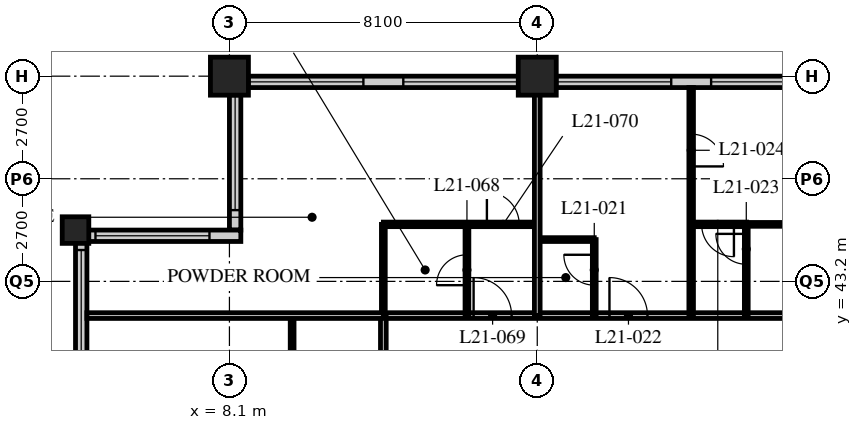
"""IFC4 building model, lengths in metres.
Left out: names, types, materials, properties, quantities, classifications, styles, units other than length and angle.
Written with IfcOpenShell. Run it as: python <this file> out.ifc"""

import sys

from ifc_helpers import new_model, si_unit, direction, frame, frame_2d, origin, origin_2d, place, context, subcontext, project, spatial, rectangle, hollow_rectangle, extrude, element, fill, save


model = new_model("IFC4")
c1 = context("Model", 3, precision=1e-05, world=origin(), true_north=direction((0.0, 1.0)))
c2 = subcontext(c1, "Body", "Model", "MODEL_VIEW")
j1 = project(units=[si_unit("LENGTHUNIT", "METRE"), si_unit("PLANEANGLEUNIT", "RADIAN")], contexts=[c1])
p1 = place(None, origin())
s1 = spatial("IfcSite", under=j1, at=p1, CompositionType="ELEMENT")
p2 = place(p1, origin())
s2 = spatial("IfcBuilding", under=s1, at=p2, CompositionType="ELEMENT")
p3 = place(p2, frame((0.0, 0.0, 84.0)))
s3 = spatial("IfcBuildingStorey", under=s2, at=p3, CompositionType="ELEMENT", Elevation=84.0)
p4 = place(p3, frame((4.05, 44.55, 0.0), z_axis=(0.0, 0.0, 1.0), x_axis=(1.0, 0.0, 0.0)))
e1 = element("IfcColumn", 1, at=p4, inside=s3, PredefinedType="COLUMN", context=c2, shape_type="SweptSolid", body=[
    extrude(hollow_rectangle(XDim=0.7, YDim=0.7, WallThickness=0.07, at=origin_2d()), origin(), (0.0, 0.0, 1.0), 3.4),
])
for number, where, z_axis, x_axis in (
    (2, (8.1, 48.6, 0.0), (0.0, 0.0, 1.0), (1.0, 0.0, 0.0)),
    (3, (16.2, 48.6, 0.0), (0.0, 0.0, 1.0), (1.0, 0.0, 0.0)),
):
    element("IfcColumn", number, at=place(p3, frame(where, z_axis=z_axis, x_axis=x_axis)), inside=s3, PredefinedType="COLUMN", context=c2, shape_type="SweptSolid", body=[
        extrude(hollow_rectangle(XDim=1.0, YDim=1.0, WallThickness=0.1, at=origin_2d()), origin(), (0.0, 0.0, 1.0), 3.4),
    ])
p5 = place(p3, frame((48.3, 48.45, 0.0), z_axis=(0.0, 0.0, 1.0), x_axis=(-1.0, 0.0, 0.0)))
e4 = element("IfcWall", 4, at=p5, inside=s3, PredefinedType="SOLIDWALL", context=c2, shape_type="SweptSolid", body=[
    extrude(rectangle(XDim=40.2, YDim=0.3, at=frame_2d((20.1, 0.0))), origin(), (0.0, 0.0, 1.0), 3.19),
])
p6 = place(p5, frame((0.225, 0.0, 0.9)))
e5 = element("IfcOpeningElement", 5, at=p6, cuts=e4, PredefinedType="OPENING", context=c2, shape_type="SweptSolid", body=[
    extrude(rectangle(XDim=3.0, YDim=1.5, at=frame_2d((1.5, 0.75))), frame((0.0, 0.16, 0.0), z_axis=(0.0, -1.0, 0.0), x_axis=(1.0, 0.0, 0.0)), (0.0, 0.0, 1.0), 0.32),
])
p7 = place(p5, frame((4.275, 0.0, 0.9)))
e6 = element("IfcOpeningElement", 6, at=p7, cuts=e4, PredefinedType="OPENING", context=c2, shape_type="SweptSolid", body=[
    extrude(rectangle(XDim=3.0, YDim=1.5, at=frame_2d((1.5, 0.75))), frame((0.0, 0.16, 0.0), z_axis=(0.0, -1.0, 0.0), x_axis=(1.0, 0.0, 0.0)), (0.0, 0.0, 1.0), 0.32),
])
p8 = place(p5, frame((8.325, 0.0, 0.9)))
e7 = element("IfcOpeningElement", 7, at=p8, cuts=e4, PredefinedType="OPENING", context=c2, shape_type="SweptSolid", body=[
    extrude(rectangle(XDim=3.0, YDim=1.5, at=frame_2d((1.5, 0.75))), frame((0.0, 0.16, 0.0), z_axis=(0.0, -1.0, 0.0), x_axis=(1.0, 0.0, 0.0)), (0.0, 0.0, 1.0), 0.32),
])
p9 = place(p5, frame((12.375, 0.0, 0.9)))
e8 = element("IfcOpeningElement", 8, at=p9, cuts=e4, PredefinedType="OPENING", context=c2, shape_type="SweptSolid", body=[
    extrude(rectangle(XDim=3.0, YDim=1.5, at=frame_2d((1.5, 0.75))), frame((0.0, 0.16, 0.0), z_axis=(0.0, -1.0, 0.0), x_axis=(1.0, 0.0, 0.0)), (0.0, 0.0, 1.0), 0.32),
])
p10 = place(p5, frame((16.425, 0.0, 0.9)))
e9 = element("IfcOpeningElement", 9, at=p10, cuts=e4, PredefinedType="OPENING", context=c2, shape_type="SweptSolid", body=[
    extrude(rectangle(XDim=3.0, YDim=1.5, at=frame_2d((1.5, 0.75))), frame((0.0, 0.16, 0.0), z_axis=(0.0, -1.0, 0.0), x_axis=(1.0, 0.0, 0.0)), (0.0, 0.0, 1.0), 0.32),
])
p11 = place(p5, frame((20.475, 0.0, 0.9)))
e10 = element("IfcOpeningElement", 10, at=p11, cuts=e4, PredefinedType="OPENING", context=c2, shape_type="SweptSolid", body=[
    extrude(rectangle(XDim=3.0, YDim=1.5, at=frame_2d((1.5, 0.75))), frame((0.0, 0.16, 0.0), z_axis=(0.0, -1.0, 0.0), x_axis=(1.0, 0.0, 0.0)), (0.0, 0.0, 1.0), 0.32),
])
p12 = place(p5, frame((24.525, 0.0, 0.9)))
e11 = element("IfcOpeningElement", 11, at=p12, cuts=e4, PredefinedType="OPENING", context=c2, shape_type="SweptSolid", body=[
    extrude(rectangle(XDim=3.0, YDim=1.5, at=frame_2d((1.5, 0.75))), frame((0.0, 0.16, 0.0), z_axis=(0.0, -1.0, 0.0), x_axis=(1.0, 0.0, 0.0)), (0.0, 0.0, 1.0), 0.32),
])
p13 = place(p5, frame((28.575, 0.0, 0.9)))
e12 = element("IfcOpeningElement", 12, at=p13, cuts=e4, PredefinedType="OPENING", context=c2, shape_type="SweptSolid", body=[
    extrude(rectangle(XDim=3.0, YDim=1.5, at=frame_2d((1.5, 0.75))), frame((0.0, 0.16, 0.0), z_axis=(0.0, -1.0, 0.0), x_axis=(1.0, 0.0, 0.0)), (0.0, 0.0, 1.0), 0.32),
])
p14 = place(p5, frame((32.625, 0.0, 0.9)))
e13 = element("IfcOpeningElement", 13, at=p14, cuts=e4, PredefinedType="OPENING", context=c2, shape_type="SweptSolid", body=[
    extrude(rectangle(XDim=3.0, YDim=1.5, at=frame_2d((1.5, 0.75))), frame((0.0, 0.16, 0.0), z_axis=(0.0, -1.0, 0.0), x_axis=(1.0, 0.0, 0.0)), (0.0, 0.0, 1.0), 0.32),
])
p15 = place(p5, frame((36.675, 0.0, 0.9)))
e14 = element("IfcOpeningElement", 14, at=p15, cuts=e4, PredefinedType="OPENING", context=c2, shape_type="SweptSolid", body=[
    extrude(rectangle(XDim=3.0, YDim=1.5, at=frame_2d((1.5, 0.75))), frame((0.0, 0.16, 0.0), z_axis=(0.0, -1.0, 0.0), x_axis=(1.0, 0.0, 0.0)), (0.0, 0.0, 1.0), 0.32),
])
p16 = place(p3, frame((8.25, 48.3, 0.0), z_axis=(0.0, 0.0, 1.0), x_axis=(0.0, -1.0, 0.0)))
e15 = element("IfcWall", 15, at=p16, inside=s3, PredefinedType="SOLIDWALL", context=c2, shape_type="SweptSolid", body=[
    extrude(rectangle(XDim=3.75, YDim=0.3, at=frame_2d((1.875, 0.0))), origin(), (0.0, 0.0, 1.0), 3.19),
])
p17 = place(p16, frame((0.225, 0.0, 0.9)))
e16 = element("IfcOpeningElement", 16, at=p17, cuts=e15, PredefinedType="OPENING", context=c2, shape_type="SweptSolid", body=[
    extrude(rectangle(XDim=3.0, YDim=1.5, at=frame_2d((1.5, 0.75))), frame((0.0, 0.16, 0.0), z_axis=(0.0, -1.0, 0.0), x_axis=(1.0, 0.0, 0.0)), (0.0, 0.0, 1.0), 0.32),
])
p18 = place(p3, frame((8.4, 44.4, 0.0), z_axis=(0.0, 0.0, 1.0), x_axis=(-1.0, 0.0, 0.0)))
e17 = element("IfcWall", 17, at=p18, inside=s3, PredefinedType="SOLIDWALL", context=c2, shape_type="SweptSolid", body=[
    extrude(rectangle(XDim=4.35, YDim=0.3, at=frame_2d((2.175, 0.0))), origin(), (0.0, 0.0, 1.0), 3.19),
])
p19 = place(p18, frame((0.825, 0.0, 0.9)))
e18 = element("IfcOpeningElement", 18, at=p19, cuts=e17, PredefinedType="OPENING", context=c2, shape_type="SweptSolid", body=[
    extrude(rectangle(XDim=3.0, YDim=1.5, at=frame_2d((1.5, 0.75))), frame((0.0, 0.16, 0.0), z_axis=(0.0, -1.0, 0.0), x_axis=(1.0, 0.0, 0.0)), (0.0, 0.0, 1.0), 0.32),
])
p20 = place(p3, frame((4.2, 44.25, 0.0), z_axis=(0.0, 0.0, 1.0), x_axis=(0.0, -1.0, 0.0)))
e19 = element("IfcWall", 19, at=p20, inside=s3, PredefinedType="SOLIDWALL", context=c2, shape_type="SweptSolid", body=[
    extrude(rectangle(XDim=3.75, YDim=0.3, at=frame_2d((1.875, 0.0))), origin(), (0.0, 0.0, 1.0), 3.19),
])
p21 = place(p20, frame((0.225, 0.0, 0.9)))
e20 = element("IfcOpeningElement", 20, at=p21, cuts=e19, PredefinedType="OPENING", context=c2, shape_type="SweptSolid", body=[
    extrude(rectangle(XDim=3.0, YDim=1.5, at=frame_2d((1.5, 0.75))), frame((0.0, 0.16, 0.0), z_axis=(0.0, -1.0, 0.0), x_axis=(1.0, 0.0, 0.0)), (0.0, 0.0, 1.0), 0.32),
])
p22 = place(p3, frame((12.15, 42.3, 0.0), z_axis=(0.0, 0.0, 1.0), x_axis=(1.0, 0.0, 0.0)))
e21 = element("IfcWall", 21, at=p22, inside=s3, PredefinedType="PARTITIONING", context=c2, shape_type="SweptSolid", body=[
    extrude(rectangle(XDim=32.4, YDim=0.15, at=frame_2d((16.2, 0.0))), origin(), (0.0, 0.0, 1.0), 3.19),
])
p23 = place(p22, frame((5.95, 0.0, 0.0)))
e22 = element("IfcOpeningElement", 22, at=p23, cuts=e21, PredefinedType="OPENING", context=c2, shape_type="SweptSolid", body=[
    extrude(rectangle(XDim=1.0, YDim=2.1, at=frame_2d((0.5, 1.05))), frame((0.0, 0.085, 0.0), z_axis=(0.0, -1.0, 0.0), x_axis=(1.0, 0.0, 0.0)), (0.0, 0.0, 1.0), 0.17),
])
p24 = place(p22, frame((14.6, 0.0, 0.0)))
e23 = element("IfcOpeningElement", 23, at=p24, cuts=e21, PredefinedType="OPENING", context=c2, shape_type="SweptSolid", body=[
    extrude(rectangle(XDim=1.0, YDim=2.1, at=frame_2d((0.5, 1.05))), frame((0.0, 0.085, 0.0), z_axis=(0.0, -1.0, 0.0), x_axis=(1.0, 0.0, 0.0)), (0.0, 0.0, 1.0), 0.17),
])
p25 = place(p22, frame((18.65, 0.0, 0.0)))
e24 = element("IfcOpeningElement", 24, at=p25, cuts=e21, PredefinedType="OPENING", context=c2, shape_type="SweptSolid", body=[
    extrude(rectangle(XDim=1.0, YDim=2.1, at=frame_2d((0.5, 1.05))), frame((0.0, 0.085, 0.0), z_axis=(0.0, -1.0, 0.0), x_axis=(1.0, 0.0, 0.0)), (0.0, 0.0, 1.0), 0.17),
])
p26 = place(p22, frame((22.15, 0.0, 0.0)))
e25 = element("IfcOpeningElement", 25, at=p26, cuts=e21, PredefinedType="OPENING", context=c2, shape_type="SweptSolid", body=[
    extrude(rectangle(XDim=1.0, YDim=2.1, at=frame_2d((0.5, 1.05))), frame((0.0, 0.085, 0.0), z_axis=(0.0, -1.0, 0.0), x_axis=(1.0, 0.0, 0.0)), (0.0, 0.0, 1.0), 0.17),
])
p27 = place(p22, frame((29.025, 0.0, 0.0)))
e26 = element("IfcOpeningElement", 26, at=p27, cuts=e21, PredefinedType="OPENING", context=c2, shape_type="SweptSolid", body=[
    extrude(rectangle(XDim=1.0, YDim=2.1, at=frame_2d((0.5, 1.05))), frame((0.0, 0.085, 0.0), z_axis=(0.0, -1.0, 0.0), x_axis=(1.0, 0.0, 0.0)), (0.0, 0.0, 1.0), 0.17),
])
p28 = place(p22, frame((2.375, 0.0, 0.0)))
e27 = element("IfcOpeningElement", 27, at=p28, cuts=e21, PredefinedType="OPENING", context=c2, shape_type="SweptSolid", body=[
    extrude(rectangle(XDim=1.0, YDim=2.1, at=frame_2d((0.5, 1.05))), frame((0.0, 0.085, 0.0), z_axis=(0.0, -1.0, 0.0), x_axis=(1.0, 0.0, 0.0)), (0.0, 0.0, 1.0), 0.17),
])
p29 = place(p3, frame((12.15, 16.2, 0.0), z_axis=(0.0, 0.0, 1.0), x_axis=(0.0, 1.0, 0.0)))
e28 = element("IfcWall", 28, at=p29, inside=s3, PredefinedType="PARTITIONING", context=c2, shape_type="SweptSolid", body=[
    extrude(rectangle(XDim=26.1, YDim=0.15, at=frame_2d((13.05, 0.0))), origin(), (0.0, 0.0, 1.0), 3.19),
])
p30 = place(p29, frame((2.45, 0.0, 0.0)))
e29 = element("IfcOpeningElement", 29, at=p30, cuts=e28, PredefinedType="OPENING", context=c2, shape_type="SweptSolid", body=[
    extrude(rectangle(XDim=1.0, YDim=2.1, at=frame_2d((0.5, 1.05))), frame((0.0, 0.085, 0.0), z_axis=(0.0, -1.0, 0.0), x_axis=(1.0, 0.0, 0.0)), (0.0, 0.0, 1.0), 0.17),
])
p31 = place(p29, frame((6.5, 0.0, 0.0)))
e30 = element("IfcOpeningElement", 30, at=p31, cuts=e28, PredefinedType="OPENING", context=c2, shape_type="SweptSolid", body=[
    extrude(rectangle(XDim=1.0, YDim=2.1, at=frame_2d((0.5, 1.05))), frame((0.0, 0.085, 0.0), z_axis=(0.0, -1.0, 0.0), x_axis=(1.0, 0.0, 0.0)), (0.0, 0.0, 1.0), 0.17),
])
p32 = place(p29, frame((10.0, 0.0, 0.0)))
e31 = element("IfcOpeningElement", 31, at=p32, cuts=e28, PredefinedType="OPENING", context=c2, shape_type="SweptSolid", body=[
    extrude(rectangle(XDim=1.0, YDim=2.1, at=frame_2d((0.5, 1.05))), frame((0.0, 0.085, 0.0), z_axis=(0.0, -1.0, 0.0), x_axis=(1.0, 0.0, 0.0)), (0.0, 0.0, 1.0), 0.17),
])
p33 = place(p29, frame((18.1, 0.0, 0.0)))
e32 = element("IfcOpeningElement", 32, at=p33, cuts=e28, PredefinedType="OPENING", context=c2, shape_type="SweptSolid", body=[
    extrude(rectangle(XDim=1.0, YDim=2.1, at=frame_2d((0.5, 1.05))), frame((0.0, 0.085, 0.0), z_axis=(0.0, -1.0, 0.0), x_axis=(1.0, 0.0, 0.0)), (0.0, 0.0, 1.0), 0.17),
])
p34 = place(p3, frame((16.2, 44.3, 0.0), z_axis=(0.0, 0.0, 1.0), x_axis=(1.0, 0.0, 0.0)))
e33 = element("IfcWall", 33, at=p34, inside=s3, PredefinedType="PARTITIONING", context=c2, shape_type="SweptSolid", body=[
    extrude(rectangle(XDim=1.5, YDim=0.1, at=frame_2d((0.75, 0.0))), origin(), (0.0, 0.0, 1.0), 3.19),
])
p35 = place(p3, frame((17.7, 42.3, 0.0), z_axis=(0.0, 0.0, 1.0), x_axis=(0.0, 1.0, 0.0)))
e34 = element("IfcWall", 34, at=p35, inside=s3, PredefinedType="PARTITIONING", context=c2, shape_type="SweptSolid", body=[
    extrude(rectangle(XDim=2.0, YDim=0.1, at=frame_2d((1.0, 0.0))), origin(), (0.0, 0.0, 1.0), 3.19),
])
p36 = place(p35, frame((0.8, 0.0, 0.0)))
e35 = element("IfcOpeningElement", 35, at=p36, cuts=e34, PredefinedType="OPENING", context=c2, shape_type="SweptSolid", body=[
    extrude(rectangle(XDim=0.8, YDim=2.1, at=frame_2d((0.4, 1.05))), frame((0.0, 0.06, 0.0), z_axis=(0.0, -1.0, 0.0), x_axis=(1.0, 0.0, 0.0)), (0.0, 0.0, 1.0), 0.12),
])
p37 = place(p3, frame((21.7, 44.7, 0.0), z_axis=(0.0, 0.0, 1.0), x_axis=(1.0, 0.0, 0.0)))
e36 = element("IfcWall", 36, at=p37, inside=s3, PredefinedType="PARTITIONING", context=c2, shape_type="SweptSolid", body=[
    extrude(rectangle(XDim=4.9, YDim=0.1, at=frame_2d((2.45, 0.0))), origin(), (0.0, 0.0, 1.0), 3.19),
])
p38 = place(p3, frame((21.7, 42.3, 0.0), z_axis=(0.0, 0.0, 1.0), x_axis=(0.0, 1.0, 0.0)))
e37 = element("IfcWall", 37, at=p38, inside=s3, PredefinedType="PARTITIONING", context=c2, shape_type="SweptSolid", body=[
    extrude(rectangle(XDim=2.4, YDim=0.1, at=frame_2d((1.2, 0.0))), origin(), (0.0, 0.0, 1.0), 3.19),
])
p39 = place(p38, frame((1.35, 0.0, 0.0)))
e38 = element("IfcOpeningElement", 38, at=p39, cuts=e37, PredefinedType="OPENING", context=c2, shape_type="SweptSolid", body=[
    extrude(rectangle(XDim=0.8, YDim=2.1, at=frame_2d((0.4, 1.05))), frame((0.0, 0.06, 0.0), z_axis=(0.0, -1.0, 0.0), x_axis=(1.0, 0.0, 0.0)), (0.0, 0.0, 1.0), 0.12),
])
p40 = place(p3, frame((20.25, 42.3, 0.0), z_axis=(0.0, 0.0, 1.0), x_axis=(0.0, 1.0, 0.0)))
e39 = element("IfcWall", 39, at=p40, inside=s3, PredefinedType="PARTITIONING", context=c2, shape_type="SweptSolid", body=[
    extrude(rectangle(XDim=6.0, YDim=0.12, at=frame_2d((3.0, 0.0))), origin(), (0.0, 0.0, 1.0), 3.19),
])
p41 = place(p40, frame((3.925, 0.0, 0.0)))
e40 = element("IfcOpeningElement", 40, at=p41, cuts=e39, PredefinedType="OPENING", context=c2, shape_type="SweptSolid", body=[
    extrude(rectangle(XDim=0.85, YDim=2.1, at=frame_2d((0.425, 1.05))), frame((0.0, 0.07, 0.0), z_axis=(0.0, -1.0, 0.0), x_axis=(1.0, 0.0, 0.0)), (0.0, 0.0, 1.0), 0.14),
])
p42 = place(p3, frame((9.75, 39.7, 0.0), z_axis=(0.0, 0.0, 1.0), x_axis=(0.0, 1.0, 0.0)))
e41 = element("IfcWall", 41, at=p42, inside=s3, PredefinedType="PARTITIONING", context=c2, shape_type="SweptSolid", body=[
    extrude(rectangle(XDim=2.6, YDim=0.1, at=frame_2d((1.3, 0.0))), origin(), (0.0, 0.0, 1.0), 3.19),
])
p43 = place(p3, frame((12.15, 44.7, 0.0), z_axis=(0.0, 0.0, 1.0), x_axis=(1.0, 0.0, 0.0)))
e42 = element("IfcWall", 42, at=p43, inside=s3, PredefinedType="PARTITIONING", context=c2, shape_type="SweptSolid", body=[
    extrude(rectangle(XDim=4.05, YDim=0.12, at=frame_2d((2.025, 0.0))), origin(), (0.0, 0.0, 1.0), 3.19),
])
p44 = place(p43, frame((2.725, 0.0, 0.0)))
e43 = element("IfcOpeningElement", 43, at=p44, cuts=e42, PredefinedType="OPENING", context=c2, shape_type="SweptSolid", body=[
    extrude(rectangle(XDim=0.85, YDim=2.1, at=frame_2d((0.425, 1.05))), frame((0.0, 0.07, 0.0), z_axis=(0.0, -1.0, 0.0), x_axis=(1.0, 0.0, 0.0)), (0.0, 0.0, 1.0), 0.14),
])
p45 = place(p3, frame((14.35, 42.3, 0.0), z_axis=(0.0, 0.0, 1.0), x_axis=(0.0, 1.0, 0.0)))
e44 = element("IfcWall", 44, at=p45, inside=s3, PredefinedType="PARTITIONING", context=c2, shape_type="SweptSolid", body=[
    extrude(rectangle(XDim=2.4, YDim=0.1, at=frame_2d((1.2, 0.0))), origin(), (0.0, 0.0, 1.0), 3.19),
])
p46 = place(p45, frame((0.8, 0.0, 0.0)))
e45 = element("IfcOpeningElement", 45, at=p46, cuts=e44, PredefinedType="OPENING", context=c2, shape_type="SweptSolid", body=[
    extrude(rectangle(XDim=0.8, YDim=2.1, at=frame_2d((0.4, 1.05))), frame((0.0, 0.06, 0.0), z_axis=(0.0, -1.0, 0.0), x_axis=(1.0, 0.0, 0.0)), (0.0, 0.0, 1.0), 0.12),
])
p47 = place(p3, frame((12.15, 42.3, 0.0), z_axis=(0.0, 0.0, 1.0), x_axis=(0.0, 1.0, 0.0)))
e46 = element("IfcWall", 46, at=p47, inside=s3, PredefinedType="PARTITIONING", context=c2, shape_type="SweptSolid", body=[
    extrude(rectangle(XDim=2.4, YDim=0.1, at=frame_2d((1.2, 0.0))), origin(), (0.0, 0.0, 1.0), 3.19),
])
p48 = place(p3, frame((4.35, 42.3, 0.0), z_axis=(0.0, 0.0, 1.0), x_axis=(1.0, 0.0, 0.0)))
e47 = element("IfcWall", 47, at=p48, inside=s3, PredefinedType="PARTITIONING", context=c2, shape_type="SweptSolid", body=[
    extrude(rectangle(XDim=7.8, YDim=0.15, at=frame_2d((3.9, 0.0))), origin(), (0.0, 0.0, 1.0), 3.19),
])
p49 = place(p3, frame((16.2, 42.3, 0.0), z_axis=(0.0, 0.0, 1.0), x_axis=(0.0, 1.0, 0.0)))
e48 = element("IfcWall", 48, at=p49, inside=s3, PredefinedType="PARTITIONING", context=c2, shape_type="SweptSolid", body=[
    extrude(rectangle(XDim=6.0, YDim=0.15, at=frame_2d((3.0, 0.0))), origin(), (0.0, 0.0, 1.0), 2.428),
])
p50 = place(p3, frame((20.25, 44.7, 0.0), z_axis=(0.0, 0.0, 1.0), x_axis=(1.0, 0.0, 0.0)))
e49 = element("IfcWall", 49, at=p50, inside=s3, PredefinedType="PARTITIONING", context=c2, shape_type="SweptSolid", body=[
    extrude(rectangle(XDim=1.46, YDim=0.12, at=frame_2d((0.73, 0.0))), origin(), (0.0, 0.0, 1.0), 3.19),
])
p51 = place(p50, frame((0.275, 0.0, 0.0)))
e50 = element("IfcOpeningElement", 50, at=p51, cuts=e49, PredefinedType="OPENING", context=c2, shape_type="SweptSolid", body=[
    extrude(rectangle(XDim=0.85, YDim=2.1, at=frame_2d((0.425, 1.05))), frame((0.0, 0.07, 0.0), z_axis=(0.0, -1.0, 0.0), x_axis=(1.0, 0.0, 0.0)), (0.0, 0.0, 1.0), 0.14),
])
p52 = place(p12, origin())
e51 = element("IfcWindow", 51, at=p52, inside=s3, PartitioningType="SINGLE_PANEL", PredefinedType="WINDOW", context=c2, shape_type="SweptSolid", body=[
    extrude(rectangle(XDim=3.0, YDim=1.5, at=frame_2d((1.5, 0.75))), frame((0.0, 0.03, 0.0), z_axis=(0.0, -1.0, 0.0), x_axis=(1.0, 0.0, 0.0)), (0.0, 0.0, 1.0), 0.06),
])
fill(e11, e51)
p53 = place(p13, origin())
e52 = element("IfcWindow", 52, at=p53, inside=s3, PartitioningType="SINGLE_PANEL", PredefinedType="WINDOW", context=c2, shape_type="SweptSolid", body=[
    extrude(rectangle(XDim=3.0, YDim=1.5, at=frame_2d((1.5, 0.75))), frame((0.0, 0.03, 0.0), z_axis=(0.0, -1.0, 0.0), x_axis=(1.0, 0.0, 0.0)), (0.0, 0.0, 1.0), 0.06),
])
fill(e12, e52)
p54 = place(p14, origin())
e53 = element("IfcWindow", 53, at=p54, inside=s3, PartitioningType="SINGLE_PANEL", PredefinedType="WINDOW", context=c2, shape_type="SweptSolid", body=[
    extrude(rectangle(XDim=3.0, YDim=1.5, at=frame_2d((1.5, 0.75))), frame((0.0, 0.03, 0.0), z_axis=(0.0, -1.0, 0.0), x_axis=(1.0, 0.0, 0.0)), (0.0, 0.0, 1.0), 0.06),
])
fill(e13, e53)
p55 = place(p15, origin())
e54 = element("IfcWindow", 54, at=p55, inside=s3, PartitioningType="SINGLE_PANEL", PredefinedType="WINDOW", context=c2, shape_type="SweptSolid", body=[
    extrude(rectangle(XDim=3.0, YDim=1.5, at=frame_2d((1.5, 0.75))), frame((0.0, 0.03, 0.0), z_axis=(0.0, -1.0, 0.0), x_axis=(1.0, 0.0, 0.0)), (0.0, 0.0, 1.0), 0.06),
])
fill(e14, e54)
p56 = place(p17, origin())
e55 = element("IfcWindow", 55, at=p56, inside=s3, PartitioningType="SINGLE_PANEL", PredefinedType="WINDOW", context=c2, shape_type="SweptSolid", body=[
    extrude(rectangle(XDim=3.0, YDim=1.5, at=frame_2d((1.5, 0.75))), frame((0.0, 0.03, 0.0), z_axis=(0.0, -1.0, 0.0), x_axis=(1.0, 0.0, 0.0)), (0.0, 0.0, 1.0), 0.06),
])
fill(e16, e55)
p57 = place(p19, origin())
e56 = element("IfcWindow", 56, at=p57, inside=s3, PartitioningType="SINGLE_PANEL", PredefinedType="WINDOW", context=c2, shape_type="SweptSolid", body=[
    extrude(rectangle(XDim=3.0, YDim=1.5, at=frame_2d((1.5, 0.75))), frame((0.0, 0.03, 0.0), z_axis=(0.0, -1.0, 0.0), x_axis=(1.0, 0.0, 0.0)), (0.0, 0.0, 1.0), 0.06),
])
fill(e18, e56)
p58 = place(p21, origin())
e57 = element("IfcWindow", 57, at=p58, inside=s3, PartitioningType="SINGLE_PANEL", PredefinedType="WINDOW", context=c2, shape_type="SweptSolid", body=[
    extrude(rectangle(XDim=3.0, YDim=1.5, at=frame_2d((1.5, 0.75))), frame((0.0, 0.03, 0.0), z_axis=(0.0, -1.0, 0.0), x_axis=(1.0, 0.0, 0.0)), (0.0, 0.0, 1.0), 0.06),
])
fill(e20, e57)
p59 = place(p36, origin())
e58 = element("IfcDoor", 58, at=p59, inside=s3, OperationType="SINGLE_SWING_RIGHT", PredefinedType="DOOR", context=c2, shape_type="SweptSolid", body=[
    extrude(rectangle(XDim=0.8, YDim=2.1, at=frame_2d((0.4, 1.05))), frame((0.0, 0.025, 0.0), z_axis=(0.0, -1.0, 0.0), x_axis=(1.0, 0.0, 0.0)), (0.0, 0.0, 1.0), 0.05),
])
fill(e35, e58)
p60 = place(p23, origin())
e59 = element("IfcDoor", 59, at=p60, inside=s3, OperationType="SINGLE_SWING_LEFT", PredefinedType="DOOR", context=c2, shape_type="SweptSolid", body=[
    extrude(rectangle(XDim=1.0, YDim=2.1, at=frame_2d((0.5, 1.05))), frame((0.0, 0.025, 0.0), z_axis=(0.0, -1.0, 0.0), x_axis=(1.0, 0.0, 0.0)), (0.0, 0.0, 1.0), 0.05),
])
fill(e22, e59)
p61 = place(p39, origin())
e60 = element("IfcDoor", 60, at=p61, inside=s3, OperationType="SINGLE_SWING_RIGHT", PredefinedType="DOOR", context=c2, shape_type="SweptSolid", body=[
    extrude(rectangle(XDim=0.8, YDim=2.1, at=frame_2d((0.4, 1.05))), frame((0.0, 0.025, 0.0), z_axis=(0.0, -1.0, 0.0), x_axis=(1.0, 0.0, 0.0)), (0.0, 0.0, 1.0), 0.05),
])
fill(e38, e60)
p62 = place(p41, origin())
e61 = element("IfcDoor", 61, at=p62, inside=s3, OperationType="SINGLE_SWING_RIGHT", PredefinedType="DOOR", context=c2, shape_type="SweptSolid", body=[
    extrude(rectangle(XDim=0.85, YDim=2.1, at=frame_2d((0.425, 1.05))), frame((0.0, 0.025, 0.0), z_axis=(0.0, -1.0, 0.0), x_axis=(1.0, 0.0, 0.0)), (0.0, 0.0, 1.0), 0.05),
])
fill(e40, e61)
p63 = place(p46, origin())
e62 = element("IfcDoor", 62, at=p63, inside=s3, OperationType="SINGLE_SWING_LEFT", PredefinedType="DOOR", context=c2, shape_type="SweptSolid", body=[
    extrude(rectangle(XDim=0.8, YDim=2.1, at=frame_2d((0.4, 1.05))), frame((0.0, 0.025, 0.0), z_axis=(0.0, -1.0, 0.0), x_axis=(1.0, 0.0, 0.0)), (0.0, 0.0, 1.0), 0.05),
])
fill(e45, e62)
p64 = place(p28, origin())
e63 = element("IfcDoor", 63, at=p64, inside=s3, OperationType="SINGLE_SWING_LEFT", PredefinedType="DOOR", context=c2, shape_type="SweptSolid", body=[
    extrude(rectangle(XDim=1.0, YDim=2.1, at=frame_2d((0.5, 1.05))), frame((0.0, 0.025, 0.0), z_axis=(0.0, -1.0, 0.0), x_axis=(1.0, 0.0, 0.0)), (0.0, 0.0, 1.0), 0.05),
])
fill(e27, e63)
p65 = place(p44, origin())
e64 = element("IfcDoor", 64, at=p65, inside=s3, OperationType="SINGLE_SWING_LEFT", PredefinedType="DOOR", context=c2, shape_type="SweptSolid", body=[
    extrude(rectangle(XDim=0.85, YDim=2.1, at=frame_2d((0.425, 1.05))), frame((0.0, 0.025, 0.0), z_axis=(0.0, -1.0, 0.0), x_axis=(1.0, 0.0, 0.0)), (0.0, 0.0, 1.0), 0.05),
])
fill(e43, e64)
p66 = place(p51, origin())
e65 = element("IfcDoor", 65, at=p66, inside=s3, OperationType="SINGLE_SWING_LEFT", PredefinedType="DOOR", context=c2, shape_type="SweptSolid", body=[
    extrude(rectangle(XDim=0.85, YDim=2.1, at=frame_2d((0.425, 1.05))), frame((0.0, 0.025, 0.0), z_axis=(0.0, -1.0, 0.0), x_axis=(1.0, 0.0, 0.0)), (0.0, 0.0, 1.0), 0.05),
])
fill(e50, e65)
save(model, sys.argv[1])
